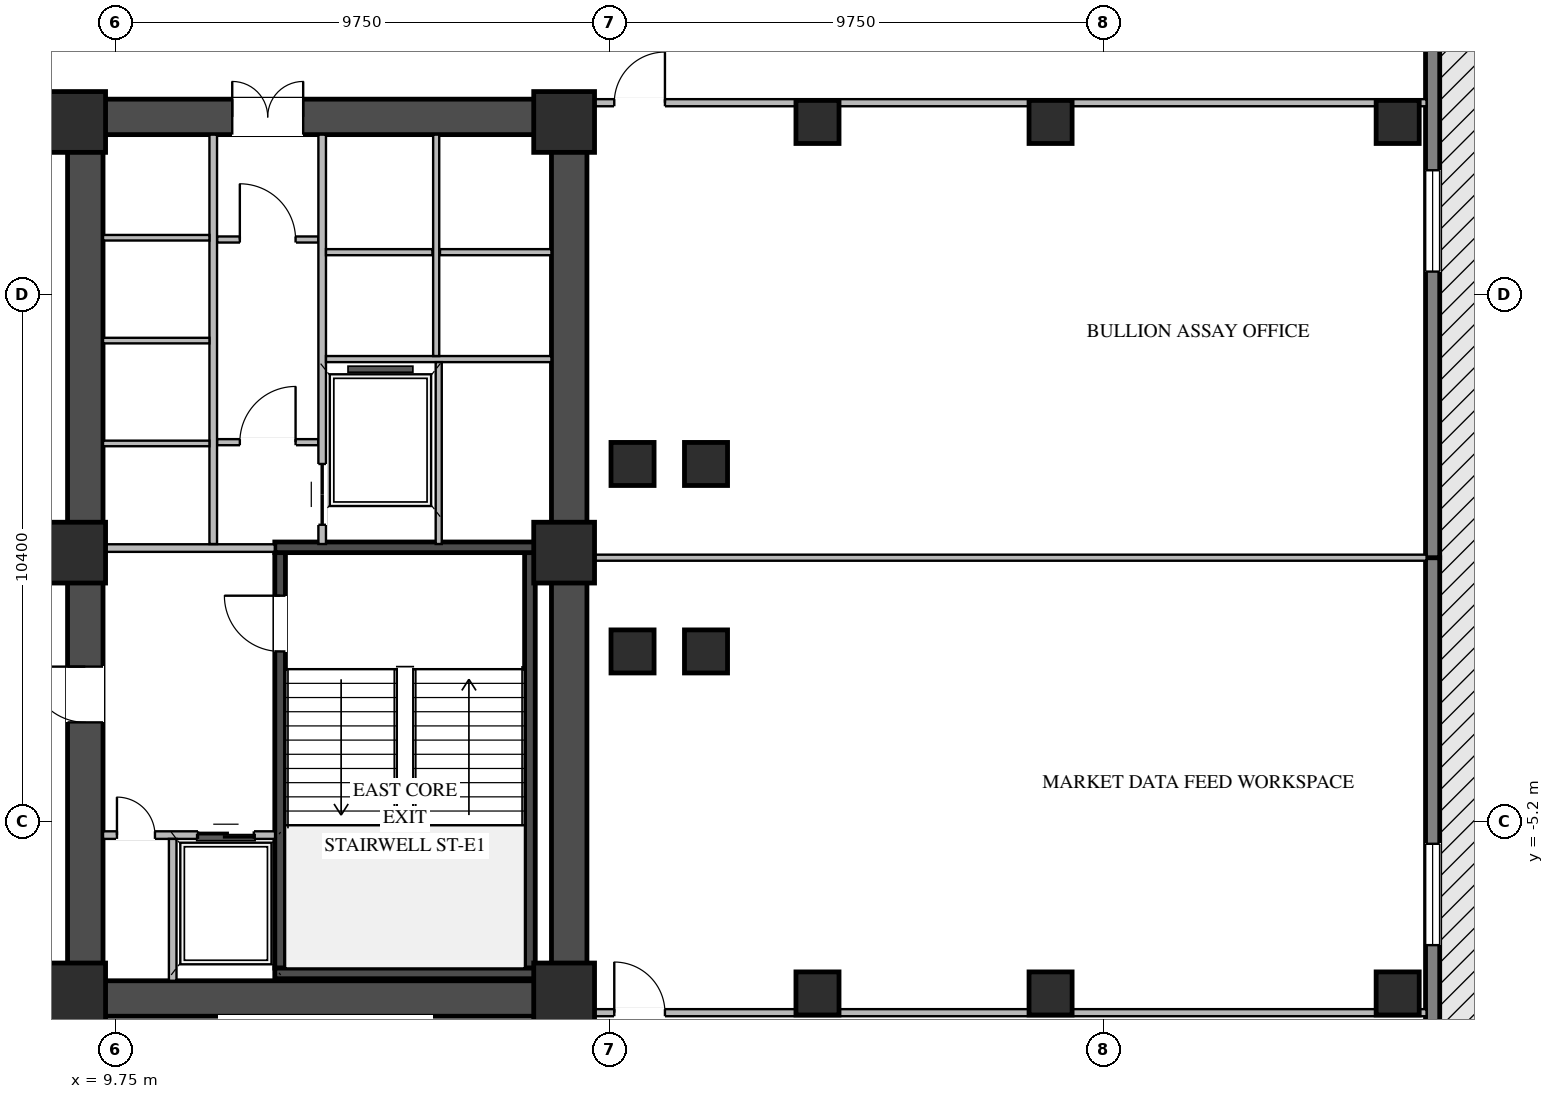
"""IFC4 building model, lengths in metres.
Left out: names, types, materials, properties, quantities, classifications, styles, units other than length and angle.
Written with IfcOpenShell. Run it as: python <this file> out.ifc"""

import sys

from ifc_helpers import new_model, si_unit, direction, frame, frame_2d, origin, origin_2d, place, context, subcontext, project, spatial, rectangle, i_section, extrude, element, fill, save


model = new_model("IFC4")
c1 = context("Model", 3, precision=1e-05, world=origin(), true_north=direction((0.0, 1.0)))
c2 = subcontext(c1, "Body", "Model", "MODEL_VIEW")
j1 = project(units=[si_unit("LENGTHUNIT", "METRE"), si_unit("PLANEANGLEUNIT", "RADIAN")], contexts=[c1])
p1 = place(None, origin())
s1 = spatial("IfcSite", under=j1, at=p1, CompositionType="ELEMENT")
p2 = place(p1, origin())
s2 = spatial("IfcBuilding", under=s1, at=p2, CompositionType="ELEMENT")
p3 = place(p2, frame((0.0, 0.0, 27.0)))
s3 = spatial("IfcBuildingStorey", under=s2, at=p3, CompositionType="ELEMENT", Elevation=27.0)
p4 = place(p3, frame((8.8, -8.7, 0.0), z_axis=(0.0, 0.0, 1.0), x_axis=(1.0, 0.0, 0.0)))
e1 = element("IfcWall", 1, at=p4, inside=s3, PredefinedType="SHEAR", context=c2, shape_type="SweptSolid", body=[
    extrude(rectangle(XDim=10.25, YDim=0.7, at=frame_2d((5.125, 0.0))), origin(), (0.0, 0.0, 1.0), 4.02),
])
p5 = place(p3, frame((8.8, 8.7, 0.0), z_axis=(0.0, 0.0, 1.0), x_axis=(1.0, 0.0, 0.0)))
e2 = element("IfcWall", 2, at=p5, inside=s3, PredefinedType="SHEAR", context=c2, shape_type="SweptSolid", body=[
    extrude(rectangle(XDim=10.25, YDim=0.7, at=frame_2d((5.125, 0.0))), origin(), (0.0, 0.0, 1.0), 4.02),
])
p6 = place(p5, frame((3.25, 0.0, 0.0)))
e3 = element("IfcOpeningElement", 3, at=p6, cuts=e2, PredefinedType="OPENING", context=c2, shape_type="SweptSolid", body=[
    extrude(rectangle(XDim=1.4, YDim=2.05, at=frame_2d((0.7, 1.025))), frame((0.0, 0.36, 0.0), z_axis=(0.0, -1.0, 0.0), x_axis=(1.0, 0.0, 0.0)), (0.0, 0.0, 1.0), 0.72),
])
p7 = place(p3, frame((9.15, -8.35, 0.0), z_axis=(0.0, 0.0, 1.0), x_axis=(0.0, 1.0, 0.0)))
e4 = element("IfcWall", 4, at=p7, inside=s3, PredefinedType="SHEAR", context=c2, shape_type="SweptSolid", body=[
    extrude(rectangle(XDim=16.7, YDim=0.7, at=frame_2d((8.35, 0.0))), origin(), (0.0, 0.0, 1.0), 4.02),
])
p8 = place(p7, frame((5.1, 0.0, 0.0)))
e5 = element("IfcOpeningElement", 5, at=p8, cuts=e4, PredefinedType="OPENING", context=c2, shape_type="SweptSolid", body=[
    extrude(rectangle(XDim=1.1, YDim=2.08, at=frame_2d((0.55, 1.04))), frame((0.0, 0.36, 0.0), z_axis=(0.0, -1.0, 0.0), x_axis=(1.0, 0.0, 0.0)), (0.0, 0.0, 1.0), 0.72),
])
p9 = place(p3, frame((18.7, -8.35, 0.0), z_axis=(0.0, 0.0, 1.0), x_axis=(0.0, 1.0, 0.0)))
e6 = element("IfcWall", 6, at=p9, inside=s3, PredefinedType="SHEAR", context=c2, shape_type="SweptSolid", body=[
    extrude(rectangle(XDim=16.7, YDim=0.7, at=frame_2d((8.35, 0.0))), origin(), (0.0, 0.0, 1.0), 4.02),
])
p10 = place(p3, frame((12.995, -8.1, 0.0), z_axis=(0.0, 0.0, 1.0), x_axis=(0.0, 1.0, 0.0)))
e7 = element("IfcWall", 7, at=p10, inside=s3, PredefinedType="SHEAR", context=c2, shape_type="SweptSolid", body=[
    extrude(rectangle(XDim=8.2, YDim=0.21, at=frame_2d((4.1, 0.0))), origin(), (0.0, 0.0, 1.0), 4.02),
])
p11 = place(p10, frame((6.25, 0.0, 0.0)))
e8 = element("IfcOpeningElement", 8, at=p11, cuts=e7, PredefinedType="OPENING", context=c2, shape_type="SweptSolid", body=[
    extrude(rectangle(XDim=1.1, YDim=2.15, at=frame_2d((0.55, 1.075))), frame((0.0, 0.115, 0.0), z_axis=(0.0, -1.0, 0.0), x_axis=(1.0, 0.0, 0.0)), (0.0, 0.0, 1.0), 0.23),
])
p12 = place(p3, frame((17.925, -8.1, 0.0), z_axis=(0.0, 0.0, 1.0), x_axis=(0.0, 1.0, 0.0)))
e9 = element("IfcWall", 9, at=p12, inside=s3, PredefinedType="SHEAR", context=c2, shape_type="SweptSolid", body=[
    extrude(rectangle(XDim=8.2, YDim=0.21, at=frame_2d((4.1, 0.0))), origin(), (0.0, 0.0, 1.0), 4.02),
])
for number, where, z_axis, x_axis in (
    (10, (12.89, -8.205, 0.0), (0.0, 0.0, 1.0), (1.0, 0.0, 0.0)),
    (11, (18.03, 0.205, 0.0), (0.0, 0.0, 1.0), (-1.0, 0.0, 0.0)),
):
    element("IfcWall", number, at=place(p3, frame(where, z_axis=z_axis, x_axis=x_axis)), inside=s3, PredefinedType="SHEAR", context=c2, shape_type="SweptSolid", body=[
        extrude(rectangle(XDim=5.14, YDim=0.21, at=frame_2d((2.57, 0.0))), origin(), (0.0, 0.0, 1.0), 4.02),
    ])
for number, where, z_axis, x_axis in (
    (12, (8.95, -8.6, 0.0), (0.0, 0.0, 1.0), (1.0, 0.0, 0.0)),
    (13, (8.95, 0.1, 0.0), (0.0, 0.0, 1.0), (1.0, 0.0, 0.0)),
    (14, (8.95, 8.6, 0.0), (0.0, 0.0, 1.0), (1.0, 0.0, 0.0)),
    (15, (18.6, -8.6, 0.0), (0.0, 0.0, 1.0), (1.0, 0.0, 0.0)),
    (16, (18.6, 0.1, 0.0), (0.0, 0.0, 1.0), (1.0, 0.0, 0.0)),
    (17, (18.6, 8.6, 0.0), (0.0, 0.0, 1.0), (1.0, 0.0, 0.0)),
):
    element("IfcColumn", number, at=place(p3, frame(where, z_axis=z_axis, x_axis=x_axis)), inside=s3, PredefinedType="COLUMN", context=c2, shape_type="SweptSolid", body=[
        extrude(rectangle(XDim=1.2, YDim=1.2, at=origin_2d()), origin(), (0.0, 0.0, 1.0), 4.2),
    ])
for number, where, z_axis, x_axis in (
    (18, (19.95, -1.85, 0.0), (0.0, 0.0, 1.0), (1.0, 0.0, 0.0)),
    (19, (19.95, 1.85, 0.0), (0.0, 0.0, 1.0), (1.0, 0.0, 0.0)),
    (20, (21.4, -1.85, 0.0), (0.0, 0.0, 1.0), (1.0, 0.0, 0.0)),
    (21, (21.4, 1.85, 0.0), (0.0, 0.0, 1.0), (1.0, 0.0, 0.0)),
    (22, (23.6, -8.6, 0.0), (0.0, 0.0, 1.0), (1.0, 0.0, 0.0)),
    (23, (23.6, 8.6, 0.0), (0.0, 0.0, 1.0), (1.0, 0.0, 0.0)),
    (24, (28.2, -8.6, 0.0), (0.0, 0.0, 1.0), (1.0, 0.0, 0.0)),
    (25, (28.2, 8.6, 0.0), (0.0, 0.0, 1.0), (1.0, 0.0, 0.0)),
    (26, (35.05, -8.6, 0.0), (0.0, 0.0, 1.0), (1.0, 0.0, 0.0)),
    (27, (35.05, 8.6, 0.0), (0.0, 0.0, 1.0), (1.0, 0.0, 0.0)),
):
    element("IfcColumn", number, at=place(p3, frame(where, z_axis=z_axis, x_axis=x_axis)), inside=s3, PredefinedType="COLUMN", context=c2, shape_type="SweptSolid", body=[
        extrude(i_section(OverallWidth=0.85, OverallDepth=0.85, WebThickness=0.032, FlangeThickness=0.048, at=origin_2d()), origin(), (0.0, 0.0, 1.0), 4.2),
    ])
p13 = place(p3, frame((35.74, 0.0, 0.0), z_axis=(0.0, 0.0, 1.0), x_axis=(0.0, -1.0, 0.0)))
e28 = element("IfcWall", 28, at=p13, inside=s3, PredefinedType="STANDARD", context=c2, shape_type="SweptSolid", body=[
    extrude(rectangle(XDim=19.94, YDim=0.28, at=frame_2d((9.97, 0.0))), origin(), (0.0, 0.0, 1.0), 4.0),
])
p14 = place(p13, frame((5.647, 0.0, 0.76)))
e29 = element("IfcOpeningElement", 29, at=p14, cuts=e28, PredefinedType="OPENING", context=c2, shape_type="SweptSolid", body=[
    extrude(rectangle(XDim=2.0, YDim=2.05, at=frame_2d((1.0, 1.025))), frame((0.0, 0.15, 0.0), z_axis=(0.0, -1.0, 0.0), x_axis=(1.0, 0.0, 0.0)), (0.0, 0.0, 1.0), 0.3),
])
p15 = place(p13, frame((11.743, 0.0, 0.76)))
e30 = element("IfcOpeningElement", 30, at=p15, cuts=e28, PredefinedType="OPENING", context=c2, shape_type="SweptSolid", body=[
    extrude(rectangle(XDim=2.0, YDim=2.05, at=frame_2d((1.0, 1.025))), frame((0.0, 0.15, 0.0), z_axis=(0.0, -1.0, 0.0), x_axis=(1.0, 0.0, 0.0)), (0.0, 0.0, 1.0), 0.3),
])
p16 = place(p3, frame((35.74, 19.94, 0.0), z_axis=(0.0, 0.0, 1.0), x_axis=(0.0, -1.0, 0.0)))
e31 = element("IfcWall", 31, at=p16, inside=s3, PredefinedType="STANDARD", context=c2, shape_type="SweptSolid", body=[
    extrude(rectangle(XDim=19.94, YDim=0.28, at=frame_2d((9.97, 0.0))), origin(), (0.0, 0.0, 1.0), 4.0),
])
p17 = place(p16, frame((6.197, 0.0, 0.76)))
e32 = element("IfcOpeningElement", 32, at=p17, cuts=e31, PredefinedType="OPENING", context=c2, shape_type="SweptSolid", body=[
    extrude(rectangle(XDim=2.0, YDim=2.05, at=frame_2d((1.0, 1.025))), frame((0.0, 0.15, 0.0), z_axis=(0.0, -1.0, 0.0), x_axis=(1.0, 0.0, 0.0)), (0.0, 0.0, 1.0), 0.3),
])
p18 = place(p16, frame((12.293, 0.0, 0.76)))
e33 = element("IfcOpeningElement", 33, at=p18, cuts=e31, PredefinedType="OPENING", context=c2, shape_type="SweptSolid", body=[
    extrude(rectangle(XDim=2.0, YDim=2.05, at=frame_2d((1.0, 1.025))), frame((0.0, 0.15, 0.0), z_axis=(0.0, -1.0, 0.0), x_axis=(1.0, 0.0, 0.0)), (0.0, 0.0, 1.0), 0.3),
])
p19 = place(p3, frame((9.5, -5.475, 0.0), z_axis=(0.0, 0.0, 1.0), x_axis=(1.0, 0.0, 0.0)))
e34 = element("IfcWall", 34, at=p19, inside=s3, PredefinedType="STANDARD", context=c2, shape_type="SweptSolid", body=[
    extrude(rectangle(XDim=3.395, YDim=0.15, at=frame_2d((1.698, 0.0))), origin(), (0.0, 0.0, 1.0), 4.0),
])
p20 = place(p19, frame((1.875, 0.0, 0.0)))
e35 = element("IfcOpeningElement", 35, at=p20, cuts=e34, PredefinedType="OPENING", context=c2, shape_type="SweptSolid", body=[
    extrude(rectangle(XDim=1.1, YDim=2.15, at=frame_2d((0.55, 1.075))), frame((0.0, 0.085, 0.0), z_axis=(0.0, -1.0, 0.0), x_axis=(1.0, 0.0, 0.0)), (0.0, 0.0, 1.0), 0.17),
])
p21 = place(p19, frame((0.275, 0.0, 0.0)))
e36 = element("IfcOpeningElement", 36, at=p21, cuts=e34, PredefinedType="OPENING", context=c2, shape_type="SweptSolid", body=[
    extrude(rectangle(XDim=0.75, YDim=2.05, at=frame_2d((0.375, 1.025))), frame((0.0, 0.085, 0.0), z_axis=(0.0, -1.0, 0.0), x_axis=(1.0, 0.0, 0.0)), (0.0, 0.0, 1.0), 0.17),
])
p22 = place(p3, frame((10.875, -8.35, 0.0), z_axis=(0.0, 0.0, 1.0), x_axis=(0.0, 1.0, 0.0)))
e37 = element("IfcWall", 37, at=p22, inside=s3, PredefinedType="STANDARD", context=c2, shape_type="SweptSolid", body=[
    extrude(rectangle(XDim=2.8, YDim=0.15, at=frame_2d((1.4, 0.0))), origin(), (0.0, 0.0, 1.0), 4.0),
])
p23 = place(p3, frame((9.5, 0.19, 0.0), z_axis=(0.0, 0.0, 1.0), x_axis=(1.0, 0.0, 0.0)))
e38 = element("IfcWall", 38, at=p23, inside=s3, PredefinedType="STANDARD", context=c2, shape_type="SweptSolid", body=[
    extrude(rectangle(XDim=3.39, YDim=0.15, at=frame_2d((1.695, 0.0))), origin(), (0.0, 0.0, 1.0), 3.395),
])
p24 = place(p3, frame((11.75, 2.28, 0.0), z_axis=(0.0, 0.0, 1.0), x_axis=(1.0, 0.0, 0.0)))
e39 = element("IfcWall", 39, at=p24, inside=s3, PredefinedType="STANDARD", context=c2, shape_type="SweptSolid", body=[
    extrude(rectangle(XDim=2.0, YDim=0.12, at=frame_2d((1.0, 0.0))), origin(), (0.0, 0.0, 1.0), 4.0),
])
p25 = place(p24, frame((0.45, 0.0, 0.0)))
e40 = element("IfcOpeningElement", 40, at=p25, cuts=e39, PredefinedType="OPENING", context=c2, shape_type="SweptSolid", body=[
    extrude(rectangle(XDim=1.1, YDim=2.1, at=frame_2d((0.55, 1.05))), frame((0.0, 0.07, 0.0), z_axis=(0.0, -1.0, 0.0), x_axis=(1.0, 0.0, 0.0)), (0.0, 0.0, 1.0), 0.14),
])
p26 = place(p3, frame((11.75, 6.28, 0.0), z_axis=(0.0, 0.0, 1.0), x_axis=(1.0, 0.0, 0.0)))
e41 = element("IfcWall", 41, at=p26, inside=s3, PredefinedType="STANDARD", context=c2, shape_type="SweptSolid", body=[
    extrude(rectangle(XDim=2.0, YDim=0.12, at=frame_2d((1.0, 0.0))), origin(), (0.0, 0.0, 1.0), 4.0),
])
p27 = place(p26, frame((0.45, 0.0, 0.0)))
e42 = element("IfcOpeningElement", 42, at=p27, cuts=e41, PredefinedType="OPENING", context=c2, shape_type="SweptSolid", body=[
    extrude(rectangle(XDim=1.1, YDim=2.1, at=frame_2d((0.55, 1.05))), frame((0.0, 0.07, 0.0), z_axis=(0.0, -1.0, 0.0), x_axis=(1.0, 0.0, 0.0)), (0.0, 0.0, 1.0), 0.14),
])
p28 = place(p3, frame((11.675, 0.27, 0.0), z_axis=(0.0, 0.0, 1.0), x_axis=(0.0, 1.0, 0.0)))
e43 = element("IfcWall", 43, at=p28, inside=s3, PredefinedType="STANDARD", context=c2, shape_type="SweptSolid", body=[
    extrude(rectangle(XDim=8.08, YDim=0.15, at=frame_2d((4.04, 0.0))), origin(), (0.0, 0.0, 1.0), 4.0),
])
for number, where, z_axis, x_axis in (
    (44, (9.5, 2.255, 0.0), (0.0, 0.0, 1.0), (1.0, 0.0, 0.0)),
    (45, (9.5, 4.285, 0.0), (0.0, 0.0, 1.0), (1.0, 0.0, 0.0)),
    (46, (9.5, 6.315, 0.0), (0.0, 0.0, 1.0), (1.0, 0.0, 0.0)),
):
    element("IfcWall", number, at=place(p3, frame(where, z_axis=z_axis, x_axis=x_axis)), inside=s3, PredefinedType="STANDARD", context=c2, shape_type="SweptSolid", body=[
        extrude(rectangle(XDim=2.1, YDim=0.11, at=frame_2d((1.05, 0.0))), origin(), (0.0, 0.0, 1.0), 4.0),
    ])
p29 = place(p3, frame((13.825, 0.27, 0.0), z_axis=(0.0, 0.0, 1.0), x_axis=(0.0, 1.0, 0.0)))
e47 = element("IfcWall", 47, at=p29, inside=s3, PredefinedType="STANDARD", context=c2, shape_type="SweptSolid", body=[
    extrude(rectangle(XDim=8.08, YDim=0.15, at=frame_2d((4.04, 0.0))), origin(), (0.0, 0.0, 1.0), 4.0),
])
p30 = place(p29, frame((0.38, 0.0, 0.0)))
e48 = element("IfcOpeningElement", 48, at=p30, cuts=e47, PredefinedType="OPENING", context=c2, shape_type="SweptSolid", body=[
    extrude(rectangle(XDim=1.2, YDim=2.1, at=frame_2d((0.6, 1.05))), frame((0.0, 0.085, 0.0), z_axis=(0.0, -1.0, 0.0), x_axis=(1.0, 0.0, 0.0)), (0.0, 0.0, 1.0), 0.17),
])
p31 = place(p3, frame((13.9, 3.92, 0.0), z_axis=(0.0, 0.0, 1.0), x_axis=(1.0, 0.0, 0.0)))
e49 = element("IfcWall", 49, at=p31, inside=s3, PredefinedType="STANDARD", context=c2, shape_type="SweptSolid", body=[
    extrude(rectangle(XDim=4.45, YDim=0.12, at=frame_2d((2.225, 0.0))), origin(), (0.0, 0.0, 1.0), 4.0),
])
p32 = place(p3, frame((16.15, 6.03, 0.0), z_axis=(0.0, 0.0, 1.0), x_axis=(1.0, 0.0, 0.0)))
e50 = element("IfcWall", 50, at=p32, inside=s3, PredefinedType="STANDARD", context=c2, shape_type="SweptSolid", body=[
    extrude(rectangle(XDim=2.2, YDim=0.12, at=frame_2d((1.1, 0.0))), origin(), (0.0, 0.0, 1.0), 4.0),
])
p33 = place(p3, frame((16.075, 3.98, 0.0), z_axis=(0.0, 0.0, 1.0), x_axis=(0.0, 1.0, 0.0)))
e51 = element("IfcWall", 51, at=p33, inside=s3, PredefinedType="STANDARD", context=c2, shape_type="SweptSolid", body=[
    extrude(rectangle(XDim=4.37, YDim=0.12, at=frame_2d((2.185, 0.0))), origin(), (0.0, 0.0, 1.0), 4.0),
])
p34 = place(p3, frame((13.9, 6.03, 0.0), z_axis=(0.0, 0.0, 1.0), x_axis=(1.0, 0.0, 0.0)))
e52 = element("IfcWall", 52, at=p34, inside=s3, PredefinedType="STANDARD", context=c2, shape_type="SweptSolid", body=[
    extrude(rectangle(XDim=2.1, YDim=0.12, at=frame_2d((1.05, 0.0))), origin(), (0.0, 0.0, 1.0), 4.0),
])
p35 = place(p3, frame((16.125, 0.27, 0.0), z_axis=(0.0, 0.0, 1.0), x_axis=(0.0, 1.0, 0.0)))
e53 = element("IfcWall", 53, at=p35, inside=s3, PredefinedType="STANDARD", context=c2, shape_type="SweptSolid", body=[
    extrude(rectangle(XDim=3.59, YDim=0.12, at=frame_2d((1.795, 0.0))), origin(), (0.0, 0.0, 1.0), 4.0),
])
p36 = place(p3, frame((19.05, 8.98, 0.0), z_axis=(0.0, 0.0, 1.0), x_axis=(1.0, 0.0, 0.0)))
e54 = element("IfcWall", 54, at=p36, inside=s3, PredefinedType="STANDARD", context=c2, shape_type="SweptSolid", body=[
    extrude(rectangle(XDim=16.57, YDim=0.14, at=frame_2d((8.285, 0.0))), origin(), (0.0, 0.0, 1.0), 4.0),
])
p37 = place(p36, frame((0.54, 0.0, 0.0)))
e55 = element("IfcOpeningElement", 55, at=p37, cuts=e54, PredefinedType="OPENING", context=c2, shape_type="SweptSolid", body=[
    extrude(rectangle(XDim=1.0, YDim=2.08, at=frame_2d((0.5, 1.04))), frame((0.0, 0.08, 0.0), z_axis=(0.0, -1.0, 0.0), x_axis=(1.0, 0.0, 0.0)), (0.0, 0.0, 1.0), 0.16),
])
p38 = place(p3, frame((19.05, -8.98, 0.0), z_axis=(0.0, 0.0, 1.0), x_axis=(1.0, 0.0, 0.0)))
e56 = element("IfcWall", 56, at=p38, inside=s3, PredefinedType="STANDARD", context=c2, shape_type="SweptSolid", body=[
    extrude(rectangle(XDim=16.57, YDim=0.14, at=frame_2d((8.285, 0.0))), origin(), (0.0, 0.0, 1.0), 4.0),
])
p39 = place(p38, frame((0.54, 0.0, 0.0)))
e57 = element("IfcOpeningElement", 57, at=p39, cuts=e56, PredefinedType="OPENING", context=c2, shape_type="SweptSolid", body=[
    extrude(rectangle(XDim=1.0, YDim=2.08, at=frame_2d((0.5, 1.04))), frame((0.0, 0.08, 0.0), z_axis=(0.0, -1.0, 0.0), x_axis=(1.0, 0.0, 0.0)), (0.0, 0.0, 1.0), 0.16),
])
p40 = place(p3, frame((19.05, 0.0, 0.0), z_axis=(0.0, 0.0, 1.0), x_axis=(1.0, 0.0, 0.0)))
e58 = element("IfcWall", 58, at=p40, inside=s3, PredefinedType="STANDARD", context=c2, shape_type="SweptSolid", body=[
    extrude(rectangle(XDim=16.57, YDim=0.12, at=frame_2d((8.285, 0.0))), origin(), (0.0, 0.0, 1.0), 3.495),
])
p41 = place(p14, origin())
e59 = element("IfcWindow", 59, at=p41, inside=s3, PartitioningType="DOUBLE_PANEL_VERTICAL", PredefinedType="WINDOW", context=c2, shape_type="SweptSolid", body=[
    extrude(rectangle(XDim=2.0, YDim=2.05, at=frame_2d((1.0, 1.025))), frame((0.0, 0.03, 0.0), z_axis=(0.0, -1.0, 0.0), x_axis=(1.0, 0.0, 0.0)), (0.0, 0.0, 1.0), 0.06),
])
fill(e29, e59)
p42 = place(p18, origin())
e60 = element("IfcWindow", 60, at=p42, inside=s3, PartitioningType="DOUBLE_PANEL_VERTICAL", PredefinedType="WINDOW", context=c2, shape_type="SweptSolid", body=[
    extrude(rectangle(XDim=2.0, YDim=2.05, at=frame_2d((1.0, 1.025))), frame((0.0, 0.03, 0.0), z_axis=(0.0, -1.0, 0.0), x_axis=(1.0, 0.0, 0.0)), (0.0, 0.0, 1.0), 0.06),
])
fill(e33, e60)
p43 = place(p11, origin())
e61 = element("IfcDoor", 61, at=p43, inside=s3, OperationType="SINGLE_SWING_RIGHT", PredefinedType="DOOR", context=c2, shape_type="SweptSolid", body=[
    extrude(rectangle(XDim=1.1, YDim=2.15, at=frame_2d((0.55, 1.075))), frame((0.0, 0.025, 0.0), z_axis=(0.0, -1.0, 0.0), x_axis=(1.0, 0.0, 0.0)), (0.0, 0.0, 1.0), 0.05),
])
fill(e8, e61)
p44 = place(p20, origin())
e62 = element("IfcDoor", 62, at=p44, inside=s3, OperationType="DOUBLE_DOOR_SLIDING", PredefinedType="DOOR", context=c2, shape_type="SweptSolid", body=[
    extrude(rectangle(XDim=1.1, YDim=2.15, at=frame_2d((0.55, 1.075))), frame((0.0, 0.025, 0.0), z_axis=(0.0, -1.0, 0.0), x_axis=(1.0, 0.0, 0.0)), (0.0, 0.0, 1.0), 0.05),
])
fill(e35, e62)
p45 = place(p21, origin())
e63 = element("IfcDoor", 63, at=p45, inside=s3, OperationType="SINGLE_SWING_LEFT", PredefinedType="DOOR", context=c2, shape_type="SweptSolid", body=[
    extrude(rectangle(XDim=0.75, YDim=2.05, at=frame_2d((0.375, 1.025))), frame((0.0, 0.025, 0.0), z_axis=(0.0, -1.0, 0.0), x_axis=(1.0, 0.0, 0.0)), (0.0, 0.0, 1.0), 0.05),
])
fill(e36, e63)
p46 = place(p8, origin())
e64 = element("IfcDoor", 64, at=p46, inside=s3, OperationType="SINGLE_SWING_RIGHT", PredefinedType="DOOR", context=c2, shape_type="SweptSolid", body=[
    extrude(rectangle(XDim=1.1, YDim=2.08, at=frame_2d((0.55, 1.04))), frame((0.0, -0.255, 0.0), z_axis=(0.0, -1.0, 0.0), x_axis=(1.0, 0.0, 0.0)), (0.0, 0.0, 1.0), 0.05),
])
fill(e5, e64)
p47 = place(p25, origin())
e65 = element("IfcDoor", 65, at=p47, inside=s3, OperationType="SINGLE_SWING_RIGHT", PredefinedType="DOOR", context=c2, shape_type="SweptSolid", body=[
    extrude(rectangle(XDim=1.1, YDim=2.1, at=frame_2d((0.55, 1.05))), frame((0.0, 0.025, 0.0), z_axis=(0.0, -1.0, 0.0), x_axis=(1.0, 0.0, 0.0)), (0.0, 0.0, 1.0), 0.05),
])
fill(e40, e65)
p48 = place(p27, origin())
e66 = element("IfcDoor", 66, at=p48, inside=s3, OperationType="SINGLE_SWING_LEFT", PredefinedType="DOOR", context=c2, shape_type="SweptSolid", body=[
    extrude(rectangle(XDim=1.1, YDim=2.1, at=frame_2d((0.55, 1.05))), frame((0.0, 0.025, 0.0), z_axis=(0.0, -1.0, 0.0), x_axis=(1.0, 0.0, 0.0)), (0.0, 0.0, 1.0), 0.05),
])
fill(e42, e66)
p49 = place(p6, origin())
e67 = element("IfcDoor", 67, at=p49, inside=s3, OperationType="DOUBLE_DOOR_SINGLE_SWING", PredefinedType="DOOR", context=c2, shape_type="SweptSolid", body=[
    extrude(rectangle(XDim=1.4, YDim=2.05, at=frame_2d((0.7, 1.025))), frame((0.0, 0.295, 0.0), z_axis=(0.0, -1.0, 0.0), x_axis=(1.0, 0.0, 0.0)), (0.0, 0.0, 1.0), 0.05),
])
fill(e3, e67)
p50 = place(p30, origin())
e68 = element("IfcDoor", 68, at=p50, inside=s3, OperationType="DOUBLE_DOOR_SLIDING", PredefinedType="DOOR", context=c2, shape_type="SweptSolid", body=[
    extrude(rectangle(XDim=1.2, YDim=2.1, at=frame_2d((0.6, 1.05))), frame((0.0, 0.025, 0.0), z_axis=(0.0, -1.0, 0.0), x_axis=(1.0, 0.0, 0.0)), (0.0, 0.0, 1.0), 0.05),
])
fill(e48, e68)
p51 = place(p37, origin())
e69 = element("IfcDoor", 69, at=p51, inside=s3, OperationType="SINGLE_SWING_RIGHT", PredefinedType="DOOR", context=c2, shape_type="SweptSolid", body=[
    extrude(rectangle(XDim=1.0, YDim=2.08, at=frame_2d((0.5, 1.04))), frame((0.0, 0.025, 0.0), z_axis=(0.0, -1.0, 0.0), x_axis=(1.0, 0.0, 0.0)), (0.0, 0.0, 1.0), 0.05),
])
fill(e55, e69)
p52 = place(p39, origin())
e70 = element("IfcDoor", 70, at=p52, inside=s3, OperationType="SINGLE_SWING_LEFT", PredefinedType="DOOR", context=c2, shape_type="SweptSolid", body=[
    extrude(rectangle(XDim=1.0, YDim=2.08, at=frame_2d((0.5, 1.04))), frame((0.0, 0.025, 0.0), z_axis=(0.0, -1.0, 0.0), x_axis=(1.0, 0.0, 0.0)), (0.0, 0.0, 1.0), 0.05),
])
fill(e57, e70)
save(model, sys.argv[1])
